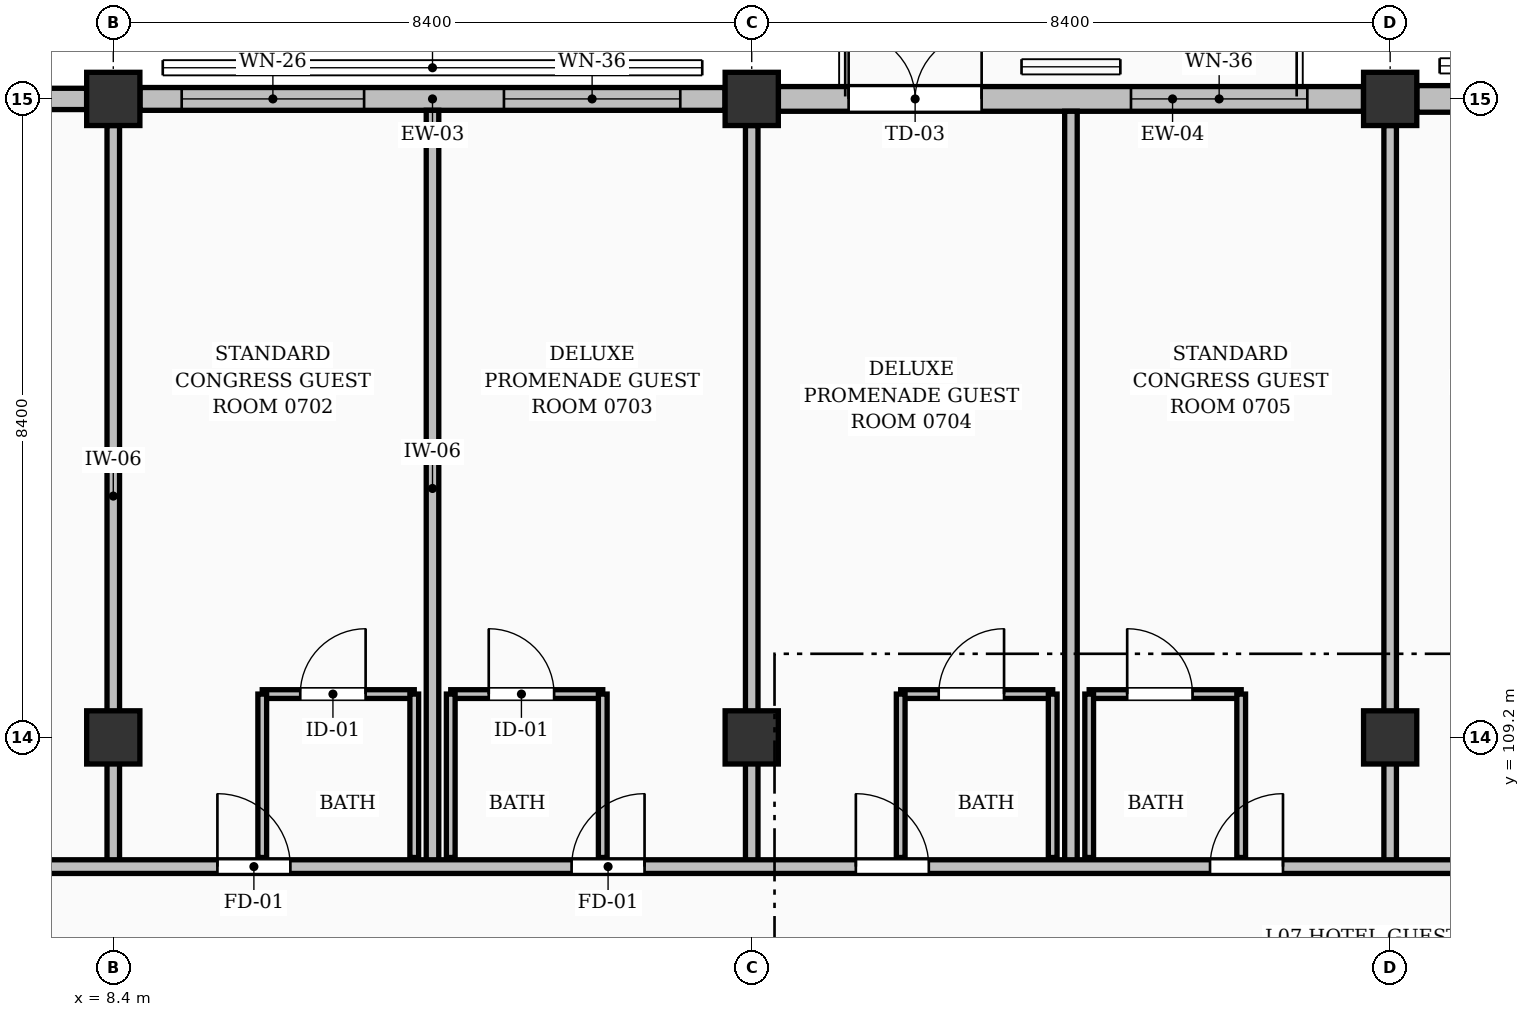
"""IFC4 building model, lengths in metres.
Left out: names, types, materials, properties, quantities, classifications, styles, units other than length and angle.
Written with IfcOpenShell. Run it as: python <this file> out.ifc"""

import sys

from ifc_helpers import new_model, si_unit, direction, frame, frame_2d, origin, origin_2d, place, context, subcontext, project, spatial, rectangle, extrude, element, fill, save


model = new_model("IFC4")
c1 = context("Model", 3, precision=1e-05, world=origin(), true_north=direction((0.0, 1.0)))
c2 = subcontext(c1, "Body", "Model", "MODEL_VIEW")
j1 = project(units=[si_unit("LENGTHUNIT", "METRE"), si_unit("PLANEANGLEUNIT", "RADIAN")], contexts=[c1])
p1 = place(None, origin())
s1 = spatial("IfcSite", under=j1, at=p1, CompositionType="ELEMENT")
p2 = place(p1, origin())
s2 = spatial("IfcBuilding", under=s1, at=p2, CompositionType="ELEMENT")
p3 = place(p2, frame((0.0, 0.0, 25.2)))
s3 = spatial("IfcBuildingStorey", under=s2, at=p3, CompositionType="ELEMENT", Elevation=25.2)
for number, where, z_axis, x_axis in (
    (1, (8.4, 109.2, 0.0), (0.0, 0.0, 1.0), (1.0, 0.0, 0.0)),
    (2, (8.4, 117.6, 0.0), (0.0, 0.0, 1.0), (1.0, 0.0, 0.0)),
    (3, (16.8, 109.2, 0.0), (0.0, 0.0, 1.0), (1.0, 0.0, 0.0)),
    (4, (16.8, 117.6, 0.0), (0.0, 0.0, 1.0), (1.0, 0.0, 0.0)),
    (5, (25.2, 109.2, 0.0), (0.0, 0.0, 1.0), (1.0, 0.0, 0.0)),
    (6, (25.2, 117.6, 0.0), (0.0, 0.0, 1.0), (1.0, 0.0, 0.0)),
):
    element("IfcColumn", number, at=place(p3, frame(where, z_axis=z_axis, x_axis=x_axis)), inside=s3, PredefinedType="COLUMN", context=c2, shape_type="SweptSolid", body=[
        extrude(rectangle(XDim=0.7, YDim=0.7, at=origin_2d()), origin(), (0.0, 0.0, 1.0), 3.36),
    ])
p4 = place(p3, frame((0.351, 117.6, 0.0), z_axis=(0.0, 0.0, 1.0), x_axis=(1.0, 0.0, 0.0)))
e7 = element("IfcWall", 7, at=p4, inside=s3, PredefinedType="SOLIDWALL", context=c2, shape_type="SweptSolid", body=[
    extrude(rectangle(XDim=7.698, YDim=0.28, at=frame_2d((3.849, 0.0))), origin(), (0.0, 0.0, 1.0), 2.414),
])
p5 = place(p4, frame((0.974, 0.0, 0.0)))
e8 = element("IfcOpeningElement", 8, at=p5, cuts=e7, PredefinedType="OPENING", context=c2, shape_type="SweptSolid", body=[
    extrude(rectangle(XDim=1.65, YDim=2.08, at=frame_2d((0.825, 1.04))), frame((0.0, 0.15, 0.0), z_axis=(0.0, -1.0, 0.0), x_axis=(1.0, 0.0, 0.0)), (0.0, 0.0, 1.0), 0.3),
])
p6 = place(p4, frame((4.649, 0.0, 0.25)))
e9 = element("IfcOpeningElement", 9, at=p6, cuts=e7, PredefinedType="OPENING", context=c2, shape_type="SweptSolid", body=[
    extrude(rectangle(XDim=2.3, YDim=1.75, at=frame_2d((1.15, 0.875))), frame((0.0, 0.15, 0.0), z_axis=(0.0, -1.0, 0.0), x_axis=(1.0, 0.0, 0.0)), (0.0, 0.0, 1.0), 0.3),
])
p7 = place(p3, frame((8.751, 117.6, 0.0), z_axis=(0.0, 0.0, 1.0), x_axis=(1.0, 0.0, 0.0)))
e10 = element("IfcWall", 10, at=p7, inside=s3, PredefinedType="SOLIDWALL", context=c2, shape_type="SweptSolid", body=[
    extrude(rectangle(XDim=7.698, YDim=0.3, at=frame_2d((3.849, 0.0))), origin(), (0.0, 0.0, 1.0), 2.414),
])
p8 = place(p7, frame((0.549, 0.0, 0.25)))
e11 = element("IfcOpeningElement", 11, at=p8, cuts=e10, PredefinedType="OPENING", context=c2, shape_type="SweptSolid", body=[
    extrude(rectangle(XDim=2.4, YDim=1.75, at=frame_2d((1.2, 0.875))), frame((0.0, 0.16, 0.0), z_axis=(0.0, -1.0, 0.0), x_axis=(1.0, 0.0, 0.0)), (0.0, 0.0, 1.0), 0.32),
])
p9 = place(p7, frame((4.789, 0.0, 0.25)))
e12 = element("IfcOpeningElement", 12, at=p9, cuts=e10, PredefinedType="OPENING", context=c2, shape_type="SweptSolid", body=[
    extrude(rectangle(XDim=2.32, YDim=1.9, at=frame_2d((1.16, 0.95))), frame((0.0, 0.16, 0.0), z_axis=(0.0, -1.0, 0.0), x_axis=(1.0, 0.0, 0.0)), (0.0, 0.0, 1.0), 0.32),
])
p10 = place(p3, frame((17.151, 117.6, 0.0), z_axis=(0.0, 0.0, 1.0), x_axis=(1.0, 0.0, 0.0)))
e13 = element("IfcWall", 13, at=p10, inside=s3, PredefinedType="SOLIDWALL", context=c2, shape_type="SweptSolid", body=[
    extrude(rectangle(XDim=7.698, YDim=0.325, at=frame_2d((3.849, 0.0))), origin(), (0.0, 0.0, 1.0), 2.414),
])
p11 = place(p10, frame((0.924, 0.0, 0.0)))
e14 = element("IfcOpeningElement", 14, at=p11, cuts=e13, PredefinedType="OPENING", context=c2, shape_type="SweptSolid", body=[
    extrude(rectangle(XDim=1.75, YDim=2.08, at=frame_2d((0.875, 1.04))), frame((0.0, 0.172, 0.0), z_axis=(0.0, -1.0, 0.0), x_axis=(1.0, 0.0, 0.0)), (0.0, 0.0, 1.0), 0.345),
])
p12 = place(p10, frame((4.639, 0.0, 0.25)))
e15 = element("IfcOpeningElement", 15, at=p12, cuts=e13, PredefinedType="OPENING", context=c2, shape_type="SweptSolid", body=[
    extrude(rectangle(XDim=2.32, YDim=1.9, at=frame_2d((1.16, 0.95))), frame((0.0, 0.172, 0.0), z_axis=(0.0, -1.0, 0.0), x_axis=(1.0, 0.0, 0.0)), (0.0, 0.0, 1.0), 0.345),
])
p13 = place(p3, frame((25.551, 117.6, 0.0), z_axis=(0.0, 0.0, 1.0), x_axis=(1.0, 0.0, 0.0)))
e16 = element("IfcWall", 16, at=p13, inside=s3, PredefinedType="SOLIDWALL", context=c2, shape_type="SweptSolid", body=[
    extrude(rectangle(XDim=7.698, YDim=0.35, at=frame_2d((3.849, 0.0))), origin(), (0.0, 0.0, 1.0), 2.414),
])
p14 = place(p13, frame((0.539, 0.0, 0.25)))
e17 = element("IfcOpeningElement", 17, at=p14, cuts=e16, PredefinedType="OPENING", context=c2, shape_type="SweptSolid", body=[
    extrude(rectangle(XDim=2.42, YDim=1.9, at=frame_2d((1.21, 0.95))), frame((0.0, 0.185, 0.0), z_axis=(0.0, -1.0, 0.0), x_axis=(1.0, 0.0, 0.0)), (0.0, 0.0, 1.0), 0.37),
])
p15 = place(p13, frame((4.774, 0.0, 0.25)))
e18 = element("IfcOpeningElement", 18, at=p15, cuts=e16, PredefinedType="OPENING", context=c2, shape_type="SweptSolid", body=[
    extrude(rectangle(XDim=2.35, YDim=1.85, at=frame_2d((1.175, 0.925))), frame((0.0, 0.185, 0.0), z_axis=(0.0, -1.0, 0.0), x_axis=(1.0, 0.0, 0.0)), (0.0, 0.0, 1.0), 0.37),
])
p16 = place(p3, frame((10.36, 109.77, 0.0), z_axis=(0.0, 0.0, 1.0), x_axis=(1.0, 0.0, 0.0)))
e19 = element("IfcWall", 19, at=p16, inside=s3, PredefinedType="PARTITIONING", context=c2, shape_type="SweptSolid", body=[
    extrude(rectangle(XDim=2.0, YDim=0.115, at=frame_2d((1.0, 0.0))), origin(), (0.0, 0.0, 1.0), 3.12),
])
p17 = place(p16, frame((0.5, 0.0, 0.0)))
e20 = element("IfcOpeningElement", 20, at=p17, cuts=e19, PredefinedType="OPENING", context=c2, shape_type="SweptSolid", body=[
    extrude(rectangle(XDim=0.86, YDim=2.05, at=frame_2d((0.43, 1.025))), frame((0.0, 0.067, 0.0), z_axis=(0.0, -1.0, 0.0), x_axis=(1.0, 0.0, 0.0)), (0.0, 0.0, 1.0), 0.135),
])
for number, where, z_axis, x_axis in (
    (21, (10.36, 107.62, 0.0), (0.0, 0.0, 1.0), (0.0, 1.0, 0.0)),
    (22, (12.36, 107.62, 0.0), (0.0, 0.0, 1.0), (0.0, 1.0, 0.0)),
):
    element("IfcWall", number, at=place(p3, frame(where, z_axis=z_axis, x_axis=x_axis)), inside=s3, PredefinedType="PARTITIONING", context=c2, shape_type="SweptSolid", body=[
        extrude(rectangle(XDim=2.15, YDim=0.115, at=frame_2d((1.075, 0.0))), origin(), (0.0, 0.0, 1.0), 3.12),
    ])
p18 = place(p3, frame((12.84, 109.77, 0.0), z_axis=(0.0, 0.0, 1.0), x_axis=(1.0, 0.0, 0.0)))
e23 = element("IfcWall", 23, at=p18, inside=s3, PredefinedType="PARTITIONING", context=c2, shape_type="SweptSolid", body=[
    extrude(rectangle(XDim=2.0, YDim=0.115, at=frame_2d((1.0, 0.0))), origin(), (0.0, 0.0, 1.0), 3.12),
])
p19 = place(p18, frame((0.5, 0.0, 0.0)))
e24 = element("IfcOpeningElement", 24, at=p19, cuts=e23, PredefinedType="OPENING", context=c2, shape_type="SweptSolid", body=[
    extrude(rectangle(XDim=0.86, YDim=2.05, at=frame_2d((0.43, 1.025))), frame((0.0, 0.067, 0.0), z_axis=(0.0, -1.0, 0.0), x_axis=(1.0, 0.0, 0.0)), (0.0, 0.0, 1.0), 0.135),
])
for number, where, z_axis, x_axis in (
    (25, (12.84, 107.62, 0.0), (0.0, 0.0, 1.0), (0.0, 1.0, 0.0)),
    (26, (14.84, 107.62, 0.0), (0.0, 0.0, 1.0), (0.0, 1.0, 0.0)),
):
    element("IfcWall", number, at=place(p3, frame(where, z_axis=z_axis, x_axis=x_axis)), inside=s3, PredefinedType="PARTITIONING", context=c2, shape_type="SweptSolid", body=[
        extrude(rectangle(XDim=2.15, YDim=0.115, at=frame_2d((1.075, 0.0))), origin(), (0.0, 0.0, 1.0), 3.12),
    ])
p20 = place(p3, frame((12.6, 107.5, 0.0), z_axis=(0.0, 0.0, 1.0), x_axis=(0.0, 1.0, 0.0)))
e27 = element("IfcWall", 27, at=p20, inside=s3, PredefinedType="PARTITIONING", context=c2, shape_type="SweptSolid", body=[
    extrude(rectangle(XDim=9.95, YDim=0.165, at=frame_2d((4.975, 0.0))), origin(), (0.0, 0.0, 1.0), 3.12),
])
p21 = place(p3, frame((8.4, 107.5, 0.0), z_axis=(0.0, 0.0, 1.0), x_axis=(0.0, 1.0, 0.0)))
e28 = element("IfcWall", 28, at=p21, inside=s3, PredefinedType="PARTITIONING", context=c2, shape_type="SweptSolid", body=[
    extrude(rectangle(XDim=9.75, YDim=0.165, at=frame_2d((4.875, 0.0))), origin(), (0.0, 0.0, 1.0), 2.013),
])
p22 = place(p3, frame((18.76, 109.77, 0.0), z_axis=(0.0, 0.0, 1.0), x_axis=(1.0, 0.0, 0.0)))
e29 = element("IfcWall", 29, at=p22, inside=s3, PredefinedType="PARTITIONING", context=c2, shape_type="SweptSolid", body=[
    extrude(rectangle(XDim=2.0, YDim=0.115, at=frame_2d((1.0, 0.0))), origin(), (0.0, 0.0, 1.0), 3.12),
])
p23 = place(p22, frame((0.5, 0.0, 0.0)))
e30 = element("IfcOpeningElement", 30, at=p23, cuts=e29, PredefinedType="OPENING", context=c2, shape_type="SweptSolid", body=[
    extrude(rectangle(XDim=0.86, YDim=2.05, at=frame_2d((0.43, 1.025))), frame((0.0, 0.067, 0.0), z_axis=(0.0, -1.0, 0.0), x_axis=(1.0, 0.0, 0.0)), (0.0, 0.0, 1.0), 0.135),
])
for number, where, z_axis, x_axis in (
    (31, (18.76, 107.62, 0.0), (0.0, 0.0, 1.0), (0.0, 1.0, 0.0)),
    (32, (20.76, 107.62, 0.0), (0.0, 0.0, 1.0), (0.0, 1.0, 0.0)),
):
    element("IfcWall", number, at=place(p3, frame(where, z_axis=z_axis, x_axis=x_axis)), inside=s3, PredefinedType="PARTITIONING", context=c2, shape_type="SweptSolid", body=[
        extrude(rectangle(XDim=2.15, YDim=0.115, at=frame_2d((1.075, 0.0))), origin(), (0.0, 0.0, 1.0), 3.12),
    ])
p24 = place(p3, frame((21.24, 109.77, 0.0), z_axis=(0.0, 0.0, 1.0), x_axis=(1.0, 0.0, 0.0)))
e33 = element("IfcWall", 33, at=p24, inside=s3, PredefinedType="PARTITIONING", context=c2, shape_type="SweptSolid", body=[
    extrude(rectangle(XDim=2.0, YDim=0.115, at=frame_2d((1.0, 0.0))), origin(), (0.0, 0.0, 1.0), 3.12),
])
p25 = place(p24, frame((0.5, 0.0, 0.0)))
e34 = element("IfcOpeningElement", 34, at=p25, cuts=e33, PredefinedType="OPENING", context=c2, shape_type="SweptSolid", body=[
    extrude(rectangle(XDim=0.86, YDim=2.05, at=frame_2d((0.43, 1.025))), frame((0.0, 0.067, 0.0), z_axis=(0.0, -1.0, 0.0), x_axis=(1.0, 0.0, 0.0)), (0.0, 0.0, 1.0), 0.135),
])
for number, where, z_axis, x_axis in (
    (35, (21.24, 107.62, 0.0), (0.0, 0.0, 1.0), (0.0, 1.0, 0.0)),
    (36, (23.24, 107.62, 0.0), (0.0, 0.0, 1.0), (0.0, 1.0, 0.0)),
):
    element("IfcWall", number, at=place(p3, frame(where, z_axis=z_axis, x_axis=x_axis)), inside=s3, PredefinedType="PARTITIONING", context=c2, shape_type="SweptSolid", body=[
        extrude(rectangle(XDim=2.15, YDim=0.115, at=frame_2d((1.075, 0.0))), origin(), (0.0, 0.0, 1.0), 3.12),
    ])
p26 = place(p3, frame((21.0, 107.5, 0.0), z_axis=(0.0, 0.0, 1.0), x_axis=(0.0, 1.0, 0.0)))
e37 = element("IfcWall", 37, at=p26, inside=s3, PredefinedType="PARTITIONING", context=c2, shape_type="SweptSolid", body=[
    extrude(rectangle(XDim=9.938, YDim=0.165, at=frame_2d((4.969, 0.0))), origin(), (0.0, 0.0, 1.0), 3.12),
])
for number, where, z_axis, x_axis in (
    (38, (16.8, 107.5, 0.0), (0.0, 0.0, 1.0), (0.0, 1.0, 0.0)),
    (39, (25.2, 107.5, 0.0), (0.0, 0.0, 1.0), (0.0, 1.0, 0.0)),
):
    element("IfcWall", number, at=place(p3, frame(where, z_axis=z_axis, x_axis=x_axis)), inside=s3, PredefinedType="PARTITIONING", context=c2, shape_type="SweptSolid", body=[
        extrude(rectangle(XDim=9.75, YDim=0.165, at=frame_2d((4.875, 0.0))), origin(), (0.0, 0.0, 1.0), 2.013),
    ])
p27 = place(p3, frame((0.15, 107.5, 0.0), z_axis=(0.0, 0.0, 1.0), x_axis=(1.0, 0.0, 0.0)))
e40 = element("IfcWall", 40, at=p27, inside=s3, PredefinedType="PARTITIONING", context=c2, shape_type="SweptSolid", body=[
    extrude(rectangle(XDim=34.22, YDim=0.18, at=frame_2d((17.11, 0.0))), origin(), (0.0, 0.0, 1.0), 3.12),
])
p28 = place(p27, frame((1.35, 0.0, 0.0)))
e41 = element("IfcOpeningElement", 41, at=p28, cuts=e40, PredefinedType="OPENING", context=c2, shape_type="SweptSolid", body=[
    extrude(rectangle(XDim=1.02, YDim=2.15, at=frame_2d((0.51, 1.075))), frame((0.0, 0.1, 0.0), z_axis=(0.0, -1.0, 0.0), x_axis=(1.0, 0.0, 0.0)), (0.0, 0.0, 1.0), 0.2),
])
p29 = place(p27, frame((9.62, 0.0, 0.0)))
e42 = element("IfcOpeningElement", 42, at=p29, cuts=e40, PredefinedType="OPENING", context=c2, shape_type="SweptSolid", body=[
    extrude(rectangle(XDim=0.96, YDim=2.15, at=frame_2d((0.48, 1.075))), frame((0.0, 0.1, 0.0), z_axis=(0.0, -1.0, 0.0), x_axis=(1.0, 0.0, 0.0)), (0.0, 0.0, 1.0), 0.2),
])
p30 = place(p27, frame((14.28, 0.0, 0.0)))
e43 = element("IfcOpeningElement", 43, at=p30, cuts=e40, PredefinedType="OPENING", context=c2, shape_type="SweptSolid", body=[
    extrude(rectangle(XDim=0.96, YDim=2.15, at=frame_2d((0.48, 1.075))), frame((0.0, 0.1, 0.0), z_axis=(0.0, -1.0, 0.0), x_axis=(1.0, 0.0, 0.0)), (0.0, 0.0, 1.0), 0.2),
])
p31 = place(p27, frame((18.02, 0.0, 0.0)))
e44 = element("IfcOpeningElement", 44, at=p31, cuts=e40, PredefinedType="OPENING", context=c2, shape_type="SweptSolid", body=[
    extrude(rectangle(XDim=0.96, YDim=2.15, at=frame_2d((0.48, 1.075))), frame((0.0, 0.1, 0.0), z_axis=(0.0, -1.0, 0.0), x_axis=(1.0, 0.0, 0.0)), (0.0, 0.0, 1.0), 0.2),
])
p32 = place(p27, frame((22.68, 0.0, 0.0)))
e45 = element("IfcOpeningElement", 45, at=p32, cuts=e40, PredefinedType="OPENING", context=c2, shape_type="SweptSolid", body=[
    extrude(rectangle(XDim=0.96, YDim=2.15, at=frame_2d((0.48, 1.075))), frame((0.0, 0.1, 0.0), z_axis=(0.0, -1.0, 0.0), x_axis=(1.0, 0.0, 0.0)), (0.0, 0.0, 1.0), 0.2),
])
p33 = place(p27, frame((26.42, 0.0, 0.0)))
e46 = element("IfcOpeningElement", 46, at=p33, cuts=e40, PredefinedType="OPENING", context=c2, shape_type="SweptSolid", body=[
    extrude(rectangle(XDim=0.96, YDim=2.15, at=frame_2d((0.48, 1.075))), frame((0.0, 0.1, 0.0), z_axis=(0.0, -1.0, 0.0), x_axis=(1.0, 0.0, 0.0)), (0.0, 0.0, 1.0), 0.2),
])
p34 = place(p27, frame((31.08, 0.0, 0.0)))
e47 = element("IfcOpeningElement", 47, at=p34, cuts=e40, PredefinedType="OPENING", context=c2, shape_type="SweptSolid", body=[
    extrude(rectangle(XDim=0.96, YDim=2.15, at=frame_2d((0.48, 1.075))), frame((0.0, 0.1, 0.0), z_axis=(0.0, -1.0, 0.0), x_axis=(1.0, 0.0, 0.0)), (0.0, 0.0, 1.0), 0.2),
])
p35 = place(p8, origin())
e48 = element("IfcWindow", 48, at=p35, inside=s3, PartitioningType="DOUBLE_PANEL_VERTICAL", PredefinedType="WINDOW", context=c2, shape_type="SweptSolid", body=[
    extrude(rectangle(XDim=2.4, YDim=1.75, at=frame_2d((1.2, 0.875))), frame((0.0, 0.03, 0.0), z_axis=(0.0, -1.0, 0.0), x_axis=(1.0, 0.0, 0.0)), (0.0, 0.0, 1.0), 0.06),
])
fill(e11, e48)
p36 = place(p9, origin())
e49 = element("IfcWindow", 49, at=p36, inside=s3, PartitioningType="DOUBLE_PANEL_VERTICAL", PredefinedType="WINDOW", context=c2, shape_type="SweptSolid", body=[
    extrude(rectangle(XDim=2.32, YDim=1.9, at=frame_2d((1.16, 0.95))), frame((0.0, 0.03, 0.0), z_axis=(0.0, -1.0, 0.0), x_axis=(1.0, 0.0, 0.0)), (0.0, 0.0, 1.0), 0.06),
])
fill(e12, e49)
p37 = place(p11, origin())
e50 = element("IfcDoor", 50, at=p37, inside=s3, OperationType="DOUBLE_DOOR_SINGLE_SWING", PredefinedType="DOOR", context=c2, shape_type="SweptSolid", body=[
    extrude(rectangle(XDim=1.75, YDim=2.08, at=frame_2d((0.875, 1.04))), frame((0.0, 0.025, 0.0), z_axis=(0.0, -1.0, 0.0), x_axis=(1.0, 0.0, 0.0)), (0.0, 0.0, 1.0), 0.05),
])
fill(e14, e50)
p38 = place(p12, origin())
e51 = element("IfcWindow", 51, at=p38, inside=s3, PartitioningType="DOUBLE_PANEL_VERTICAL", PredefinedType="WINDOW", context=c2, shape_type="SweptSolid", body=[
    extrude(rectangle(XDim=2.32, YDim=1.9, at=frame_2d((1.16, 0.95))), frame((0.0, 0.03, 0.0), z_axis=(0.0, -1.0, 0.0), x_axis=(1.0, 0.0, 0.0)), (0.0, 0.0, 1.0), 0.06),
])
fill(e15, e51)
p39 = place(p17, origin())
e52 = element("IfcDoor", 52, at=p39, inside=s3, OperationType="SINGLE_SWING_RIGHT", PredefinedType="DOOR", context=c2, shape_type="SweptSolid", body=[
    extrude(rectangle(XDim=0.86, YDim=2.05, at=frame_2d((0.43, 1.025))), frame((0.0, 0.025, 0.0), z_axis=(0.0, -1.0, 0.0), x_axis=(1.0, 0.0, 0.0)), (0.0, 0.0, 1.0), 0.05),
])
fill(e20, e52)
p40 = place(p19, origin())
e53 = element("IfcDoor", 53, at=p40, inside=s3, OperationType="SINGLE_SWING_LEFT", PredefinedType="DOOR", context=c2, shape_type="SweptSolid", body=[
    extrude(rectangle(XDim=0.86, YDim=2.05, at=frame_2d((0.43, 1.025))), frame((0.0, 0.025, 0.0), z_axis=(0.0, -1.0, 0.0), x_axis=(1.0, 0.0, 0.0)), (0.0, 0.0, 1.0), 0.05),
])
fill(e24, e53)
p41 = place(p23, origin())
e54 = element("IfcDoor", 54, at=p41, inside=s3, OperationType="SINGLE_SWING_RIGHT", PredefinedType="DOOR", context=c2, shape_type="SweptSolid", body=[
    extrude(rectangle(XDim=0.86, YDim=2.05, at=frame_2d((0.43, 1.025))), frame((0.0, 0.025, 0.0), z_axis=(0.0, -1.0, 0.0), x_axis=(1.0, 0.0, 0.0)), (0.0, 0.0, 1.0), 0.05),
])
fill(e30, e54)
p42 = place(p25, origin())
e55 = element("IfcDoor", 55, at=p42, inside=s3, OperationType="SINGLE_SWING_LEFT", PredefinedType="DOOR", context=c2, shape_type="SweptSolid", body=[
    extrude(rectangle(XDim=0.86, YDim=2.05, at=frame_2d((0.43, 1.025))), frame((0.0, 0.025, 0.0), z_axis=(0.0, -1.0, 0.0), x_axis=(1.0, 0.0, 0.0)), (0.0, 0.0, 1.0), 0.05),
])
fill(e34, e55)
p43 = place(p29, origin())
e56 = element("IfcDoor", 56, at=p43, inside=s3, OperationType="SINGLE_SWING_LEFT", PredefinedType="DOOR", context=c2, shape_type="SweptSolid", body=[
    extrude(rectangle(XDim=0.96, YDim=2.15, at=frame_2d((0.48, 1.075))), frame((0.0, 0.025, 0.0), z_axis=(0.0, -1.0, 0.0), x_axis=(1.0, 0.0, 0.0)), (0.0, 0.0, 1.0), 0.05),
])
fill(e42, e56)
p44 = place(p30, origin())
e57 = element("IfcDoor", 57, at=p44, inside=s3, OperationType="SINGLE_SWING_RIGHT", PredefinedType="DOOR", context=c2, shape_type="SweptSolid", body=[
    extrude(rectangle(XDim=0.96, YDim=2.15, at=frame_2d((0.48, 1.075))), frame((0.0, 0.025, 0.0), z_axis=(0.0, -1.0, 0.0), x_axis=(1.0, 0.0, 0.0)), (0.0, 0.0, 1.0), 0.05),
])
fill(e43, e57)
p45 = place(p31, origin())
e58 = element("IfcDoor", 58, at=p45, inside=s3, OperationType="SINGLE_SWING_LEFT", PredefinedType="DOOR", context=c2, shape_type="SweptSolid", body=[
    extrude(rectangle(XDim=0.96, YDim=2.15, at=frame_2d((0.48, 1.075))), frame((0.0, 0.025, 0.0), z_axis=(0.0, -1.0, 0.0), x_axis=(1.0, 0.0, 0.0)), (0.0, 0.0, 1.0), 0.05),
])
fill(e44, e58)
p46 = place(p32, origin())
e59 = element("IfcDoor", 59, at=p46, inside=s3, OperationType="SINGLE_SWING_RIGHT", PredefinedType="DOOR", context=c2, shape_type="SweptSolid", body=[
    extrude(rectangle(XDim=0.96, YDim=2.15, at=frame_2d((0.48, 1.075))), frame((0.0, 0.025, 0.0), z_axis=(0.0, -1.0, 0.0), x_axis=(1.0, 0.0, 0.0)), (0.0, 0.0, 1.0), 0.05),
])
fill(e45, e59)
save(model, sys.argv[1])
